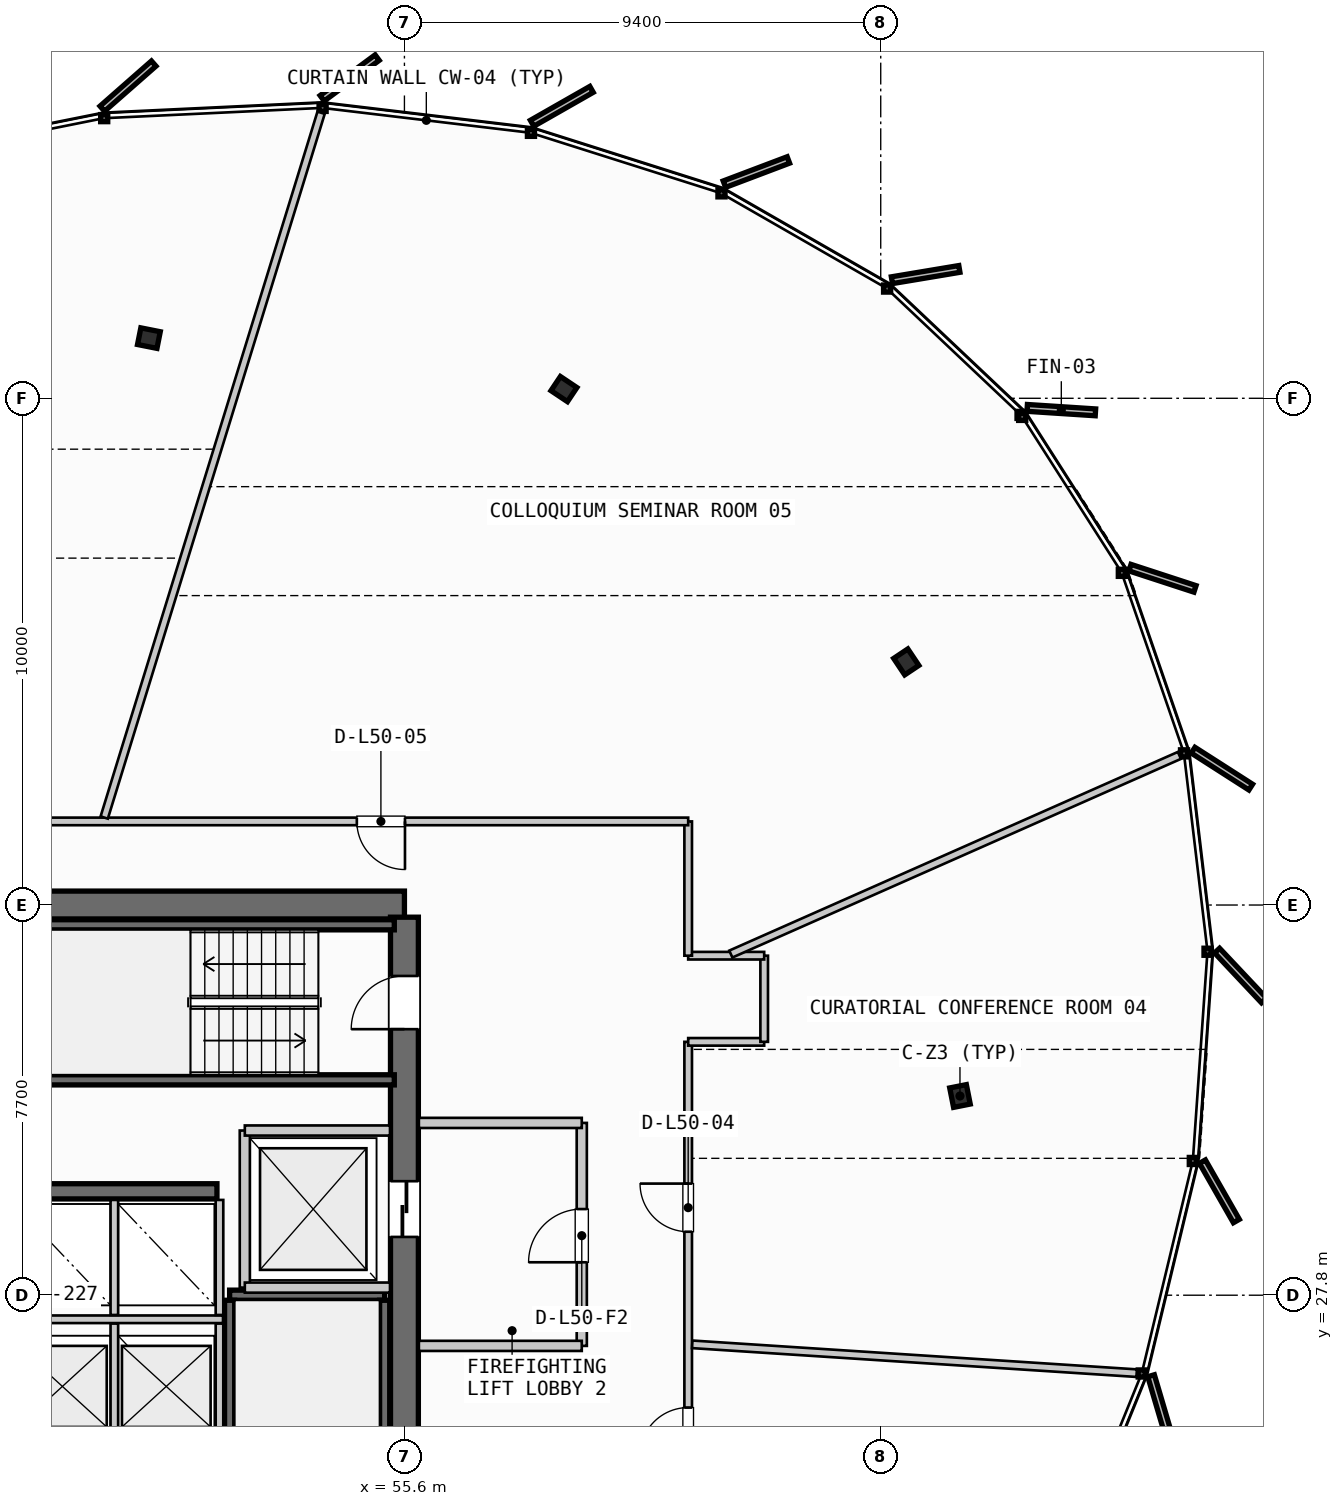
"""IFC4 building model, lengths in metres.
Left out: names, types, materials, properties, quantities, classifications, styles, units other than length and angle.
Written with IfcOpenShell. Run it as: python <this file> out.ifc"""

import sys

from ifc_helpers import new_model, si_unit, direction, frame, frame_2d, origin, origin_2d, place, context, subcontext, project, spatial, rectangle, i_section, extrude, source, transform, mapped, element, fill, save


model = new_model("IFC4")
c1 = context("Model", 3, precision=1e-05, world=origin(), true_north=direction((0.0, 1.0)))
c2 = subcontext(c1, "Body", "Model", "MODEL_VIEW")
j1 = project(units=[si_unit("LENGTHUNIT", "METRE"), si_unit("PLANEANGLEUNIT", "RADIAN")], contexts=[c1])
p1 = place(None, origin())
s1 = spatial("IfcSite", under=j1, at=p1, CompositionType="ELEMENT")
p2 = place(p1, origin())
s2 = spatial("IfcBuilding", under=s1, at=p2, CompositionType="ELEMENT")
p3 = place(p2, frame((0.0, 0.0, 193.9)))
s3 = spatial("IfcBuildingStorey", under=s2, at=p3, CompositionType="ELEMENT", Elevation=193.9)
p4 = place(p3, frame((55.6, 35.5, 0.0), z_axis=(0.0, 0.0, 1.0), x_axis=(-1.0, 0.0, 0.0)))
e1 = element("IfcWall", 1, at=p4, inside=s3, PredefinedType="SHEAR", context=c2, shape_type="SweptSolid", body=[
    extrude(rectangle(XDim=17.6, YDim=0.55, at=frame_2d((8.8, 0.0))), origin(), (0.0, 0.0, 1.0), 3.26),
])
p5 = place(p4, frame((8.05, 0.0, 0.0)))
e2 = element("IfcOpeningElement", 2, at=p5, cuts=e1, PredefinedType="OPENING", context=c2, shape_type="SweptSolid", body=[
    extrude(rectangle(XDim=1.5, YDim=2.2, at=frame_2d((0.75, 1.1))), frame((0.0, 0.285, 0.0), z_axis=(0.0, -1.0, 0.0), x_axis=(1.0, 0.0, 0.0)), (0.0, 0.0, 1.0), 0.57),
])
p6 = place(p4, frame((15.1, 0.0, 0.0)))
e3 = element("IfcOpeningElement", 3, at=p6, cuts=e1, PredefinedType="OPENING", context=c2, shape_type="SweptSolid", body=[
    extrude(rectangle(XDim=0.95, YDim=2.15, at=frame_2d((0.475, 1.075))), frame((0.0, 0.285, 0.0), z_axis=(0.0, -1.0, 0.0), x_axis=(1.0, 0.0, 0.0)), (0.0, 0.0, 1.0), 0.57),
])
p7 = place(p4, frame((12.9, 0.0, 0.0)))
e4 = element("IfcOpeningElement", 4, at=p7, cuts=e1, PredefinedType="OPENING", context=c2, shape_type="SweptSolid", body=[
    extrude(rectangle(XDim=0.9, YDim=2.15, at=frame_2d((0.45, 1.075))), frame((0.0, 0.285, 0.0), z_axis=(0.0, -1.0, 0.0), x_axis=(1.0, 0.0, 0.0)), (0.0, 0.0, 1.0), 0.57),
])
p8 = place(p4, frame((10.6, 0.0, 0.0)))
e5 = element("IfcOpeningElement", 5, at=p8, cuts=e1, PredefinedType="OPENING", context=c2, shape_type="SweptSolid", body=[
    extrude(rectangle(XDim=0.95, YDim=2.15, at=frame_2d((0.475, 1.075))), frame((0.0, 0.285, 0.0), z_axis=(0.0, -1.0, 0.0), x_axis=(1.0, 0.0, 0.0)), (0.0, 0.0, 1.0), 0.57),
])
p9 = place(p3, frame((55.6, 20.34, 0.0), z_axis=(0.0, 0.0, 1.0), x_axis=(0.0, 1.0, 0.0)))
e6 = element("IfcWall", 6, at=p9, inside=s3, PredefinedType="SHEAR", context=c2, shape_type="SweptSolid", body=[
    extrude(rectangle(XDim=14.92, YDim=0.55, at=frame_2d((7.46, 0.0))), origin(), (0.0, 0.0, 1.0), 3.26),
])
p10 = place(p9, frame((12.71, 0.0, 0.0)))
e7 = element("IfcOpeningElement", 7, at=p10, cuts=e6, PredefinedType="OPENING", context=c2, shape_type="SweptSolid", body=[
    extrude(rectangle(XDim=1.05, YDim=2.15, at=frame_2d((0.525, 1.075))), frame((0.0, 0.285, 0.0), z_axis=(0.0, -1.0, 0.0), x_axis=(1.0, 0.0, 0.0)), (0.0, 0.0, 1.0), 0.57),
])
p11 = place(p9, frame((8.61, 0.0, 0.0)))
e8 = element("IfcOpeningElement", 8, at=p11, cuts=e6, PredefinedType="OPENING", context=c2, shape_type="SweptSolid", body=[
    extrude(rectangle(XDim=1.1, YDim=2.2, at=frame_2d((0.55, 1.1))), frame((0.0, 0.285, 0.0), z_axis=(0.0, -1.0, 0.0), x_axis=(1.0, 0.0, 0.0)), (0.0, 0.0, 1.0), 0.57),
])
p12 = place(p3, frame((47.65, 29.85, 0.0), z_axis=(0.0, 0.0, 1.0), x_axis=(1.0, 0.0, 0.0)))
e9 = element("IfcWall", 9, at=p12, inside=s3, PredefinedType="SHEAR", context=c2, shape_type="SweptSolid", body=[
    extrude(rectangle(XDim=4.25, YDim=0.3, at=frame_2d((2.125, 0.0))), origin(), (0.0, 0.0, 1.0), 3.26),
])
m1 = source(origin(), c2, "Body", "SweptSolid", [
    extrude(i_section(OverallWidth=0.391, OverallDepth=0.335, WebThickness=0.023, FlangeThickness=0.034, FilletRadius=0.015, at=origin_2d()), origin(), (0.0, 0.0, 1.0), 3.26),
])
for number, where, z_axis, x_axis in (
    (10, (66.564, 31.731, 0.0), (0.0, 0.0, 1.0), (0.981, 0.195, 0.0)),
    (11, (65.504, 40.298, 0.0), (0.0, 0.0, 1.0), (0.831, 0.556, 0.0)),
    (12, (58.748, 45.681, 0.0), (0.0, 0.0, 1.0), (0.556, 0.831, 0.0)),
    (13, (50.557, 46.688, 0.0), (0.0, 0.0, 1.0), (0.195, 0.981, 0.0)),
):
    element("IfcColumn", number, at=place(p3, frame(where, z_axis=z_axis, x_axis=x_axis)), inside=s3, PredefinedType="COLUMN", context=c2, shape_type="MappedRepresentation", body=[
        mapped(m1, transform((0.0, 0.0, 0.0), scale=1.0)),
    ])
p13 = place(p3, frame((52.15, 27.8, 0.0), z_axis=(0.0, 0.0, 1.0), x_axis=(1.0, 0.0, 0.0)))
e14 = element("IfcWall", 14, at=p13, inside=s3, PredefinedType="SHEAR", context=c2, shape_type="SweptSolid", body=[
    extrude(rectangle(XDim=3.06, YDim=0.2, at=frame_2d((1.53, 0.0))), origin(), (0.0, 0.0, 1.0), 3.26),
])
for number, where, z_axis, x_axis in (
    (15, (55.21, 27.7, 0.0), (0.0, 0.0, 1.0), (0.0, -1.0, 0.0)),
    (16, (52.15, 20.35, 0.0), (0.0, 0.0, 1.0), (0.0, 1.0, 0.0)),
    (17, (48.05, 35.11, 0.0), (0.0, 0.0, 1.0), (1.0, 0.0, 0.0)),
    (18, (55.4, 32.05, 0.0), (0.0, 0.0, 1.0), (-1.0, 0.0, 0.0)),
):
    element("IfcWall", number, at=place(p3, frame(where, z_axis=z_axis, x_axis=x_axis)), inside=s3, PredefinedType="SHEAR", context=c2, shape_type="SweptSolid", body=[
        extrude(rectangle(XDim=7.35, YDim=0.2, at=frame_2d((3.675, 0.0))), origin(), (0.0, 0.0, 1.0), 3.26),
    ])
p14 = place(p3, frame((52.45, 27.95, 0.0), z_axis=(0.0, 0.0, 1.0), x_axis=(0.0, 1.0, 0.0)))
e19 = element("IfcWall", 19, at=p14, inside=s3, PredefinedType="PARTITIONING", context=c2, shape_type="SweptSolid", body=[
    extrude(rectangle(XDim=3.1, YDim=0.2, at=frame_2d((1.55, 0.0))), origin(), (0.0, 0.0, 1.0), 2.735),
])
for number, where, z_axis, x_axis in (
    (20, (52.45, 27.95, 0.0), (0.0, 0.0, 1.0), (1.0, 0.0, 0.0)),
    (21, (52.45, 31.05, 0.0), (0.0, 0.0, 1.0), (1.0, 0.0, 0.0)),
):
    element("IfcWall", number, at=place(p3, frame(where, z_axis=z_axis, x_axis=x_axis)), inside=s3, PredefinedType="PARTITIONING", context=c2, shape_type="SweptSolid", body=[
        extrude(rectangle(XDim=2.865, YDim=0.2, at=frame_2d((1.433, 0.0))), origin(), (0.0, 0.0, 1.0), 2.735),
    ])
p15 = place(p3, frame((59.1, 26.8, 0.0), z_axis=(0.0, 0.0, 1.0), x_axis=(0.0, 1.0, 0.0)))
e22 = element("IfcWall", 22, at=p15, inside=s3, PredefinedType="PARTITIONING", context=c2, shape_type="SweptSolid", body=[
    extrude(rectangle(XDim=4.4, YDim=0.2, at=frame_2d((2.2, 0.0))), origin(), (0.0, 0.0, 1.0), 2.735),
])
p16 = place(p15, frame((1.65, 0.0, 0.0)))
e23 = element("IfcOpeningElement", 23, at=p16, cuts=e22, PredefinedType="OPENING", context=c2, shape_type="SweptSolid", body=[
    extrude(rectangle(XDim=1.05, YDim=2.15, at=frame_2d((0.525, 1.075))), frame((0.0, 0.11, 0.0), z_axis=(0.0, -1.0, 0.0), x_axis=(1.0, 0.0, 0.0)), (0.0, 0.0, 1.0), 0.22),
])
for number, where, z_axis, x_axis in (
    (24, (55.885, 26.8, 0.0), (0.0, 0.0, 1.0), (1.0, 0.0, 0.0)),
    (25, (55.885, 31.2, 0.0), (0.0, 0.0, 1.0), (1.0, 0.0, 0.0)),
):
    element("IfcWall", number, at=place(p3, frame(where, z_axis=z_axis, x_axis=x_axis)), inside=s3, PredefinedType="PARTITIONING", context=c2, shape_type="SweptSolid", body=[
        extrude(rectangle(XDim=3.215, YDim=0.2, at=frame_2d((1.607, 0.0))), origin(), (0.0, 0.0, 1.0), 2.735),
    ])
p17 = place(p3, frame((47.7, 27.325, 0.0), z_axis=(0.0, 0.0, 1.0), x_axis=(1.0, 0.0, 0.0)))
e26 = element("IfcWall", 26, at=p17, inside=s3, PredefinedType="PARTITIONING", context=c2, shape_type="SweptSolid", body=[
    extrude(rectangle(XDim=4.32, YDim=0.15, at=frame_2d((2.16, 0.0))), origin(), (0.0, 0.0, 1.0), 2.735),
])
for number, where, z_axis, x_axis in (
    (27, (49.875, 24.92, 0.0), (0.0, 0.0, 1.0), (0.0, 1.0, 0.0)),
    (28, (51.95, 24.92, 0.0), (0.0, 0.0, 1.0), (0.0, 1.0, 0.0)),
):
    element("IfcWall", number, at=place(p3, frame(where, z_axis=z_axis, x_axis=x_axis)), inside=s3, PredefinedType="PARTITIONING", context=c2, shape_type="SweptSolid", body=[
        extrude(rectangle(XDim=2.32, YDim=0.15, at=frame_2d((1.16, 0.0))), origin(), (0.0, 0.0, 1.0), 2.735),
    ])
for number, where, z_axis, x_axis in (
    (29, (49.875, 27.41, 0.0), (0.0, 0.0, 1.0), (0.0, 1.0, 0.0)),
    (30, (51.95, 27.41, 0.0), (0.0, 0.0, 1.0), (0.0, 1.0, 0.0)),
):
    element("IfcWall", number, at=place(p3, frame(where, z_axis=z_axis, x_axis=x_axis)), inside=s3, PredefinedType="PARTITIONING", context=c2, shape_type="SweptSolid", body=[
        extrude(rectangle(XDim=2.27, YDim=0.15, at=frame_2d((1.135, 0.0))), origin(), (0.0, 0.0, 1.0), 2.735),
    ])
p18 = place(p3, frame((61.2, 22.8, 0.0), z_axis=(0.0, 0.0, 1.0), x_axis=(0.0, 1.0, 0.0)))
e31 = element("IfcWall", 31, at=p18, inside=s3, PredefinedType="PARTITIONING", context=c2, shape_type="SweptSolid", body=[
    extrude(rectangle(XDim=10.0, YDim=0.15, at=frame_2d((5.0, 0.0))), origin(), (0.0, 0.0, 1.0), 2.735),
])
p19 = place(p18, frame((1.833, 0.0, 0.0)))
e32 = element("IfcOpeningElement", 32, at=p19, cuts=e31, PredefinedType="OPENING", context=c2, shape_type="SweptSolid", body=[
    extrude(rectangle(XDim=0.95, YDim=2.15, at=frame_2d((0.475, 1.075))), frame((0.0, 0.085, 0.0), z_axis=(0.0, -1.0, 0.0), x_axis=(1.0, 0.0, 0.0)), (0.0, 0.0, 1.0), 0.17),
])
p20 = place(p18, frame((6.253, 0.0, 0.0)))
e33 = element("IfcOpeningElement", 33, at=p20, cuts=e31, PredefinedType="OPENING", context=c2, shape_type="SweptSolid", body=[
    extrude(rectangle(XDim=0.95, YDim=2.15, at=frame_2d((0.475, 1.075))), frame((0.0, 0.085, 0.0), z_axis=(0.0, -1.0, 0.0), x_axis=(1.0, 0.0, 0.0)), (0.0, 0.0, 1.0), 0.17),
])
p21 = place(p3, frame((61.2, 32.8, 0.0), z_axis=(0.0, 0.0, 1.0), x_axis=(1.0, 0.0, 0.0)))
e34 = element("IfcWall", 34, at=p21, inside=s3, PredefinedType="PARTITIONING", context=c2, shape_type="SweptSolid", body=[
    extrude(rectangle(XDim=1.5, YDim=0.15, at=frame_2d((0.75, 0.0))), origin(), (0.0, 0.0, 1.0), 2.735),
])
p22 = place(p3, frame((62.7, 32.8, 0.0), z_axis=(0.0, 0.0, 1.0), x_axis=(0.0, 1.0, 0.0)))
e35 = element("IfcWall", 35, at=p22, inside=s3, PredefinedType="PARTITIONING", context=c2, shape_type="SweptSolid", body=[
    extrude(rectangle(XDim=1.7, YDim=0.15, at=frame_2d((0.85, 0.0))), origin(), (0.0, 0.0, 1.0), 2.735),
])
p23 = place(p3, frame((62.7, 34.5, 0.0), z_axis=(0.0, 0.0, 1.0), x_axis=(-1.0, 0.0, 0.0)))
e36 = element("IfcWall", 36, at=p23, inside=s3, PredefinedType="PARTITIONING", context=c2, shape_type="SweptSolid", body=[
    extrude(rectangle(XDim=1.5, YDim=0.15, at=frame_2d((0.75, 0.0))), origin(), (0.0, 0.0, 1.0), 2.735),
])
p24 = place(p3, frame((61.2, 34.5, 0.0), z_axis=(0.0, 0.0, 1.0), x_axis=(0.0, 1.0, 0.0)))
e37 = element("IfcWall", 37, at=p24, inside=s3, PredefinedType="PARTITIONING", context=c2, shape_type="SweptSolid", body=[
    extrude(rectangle(XDim=2.65, YDim=0.15, at=frame_2d((1.325, 0.0))), origin(), (0.0, 0.0, 1.0), 2.735),
])
p25 = place(p3, frame((61.2, 37.15, 0.0), z_axis=(0.0, 0.0, 1.0), x_axis=(-1.0, 0.0, 0.0)))
e38 = element("IfcWall", 38, at=p25, inside=s3, PredefinedType="PARTITIONING", context=c2, shape_type="SweptSolid", body=[
    extrude(rectangle(XDim=28.35, YDim=0.15, at=frame_2d((14.175, 0.0))), origin(), (0.0, 0.0, 1.0), 2.735),
])
p26 = place(p25, frame((5.589, 0.0, 0.0)))
e39 = element("IfcOpeningElement", 39, at=p26, cuts=e38, PredefinedType="OPENING", context=c2, shape_type="SweptSolid", body=[
    extrude(rectangle(XDim=0.95, YDim=2.15, at=frame_2d((0.475, 1.075))), frame((0.0, 0.085, 0.0), z_axis=(0.0, -1.0, 0.0), x_axis=(1.0, 0.0, 0.0)), (0.0, 0.0, 1.0), 0.17),
])
p27 = place(p25, frame((18.507, 0.0, 0.0)))
e40 = element("IfcOpeningElement", 40, at=p27, cuts=e38, PredefinedType="OPENING", context=c2, shape_type="SweptSolid", body=[
    extrude(rectangle(XDim=0.95, YDim=2.15, at=frame_2d((0.475, 1.075))), frame((0.0, 0.085, 0.0), z_axis=(0.0, -1.0, 0.0), x_axis=(1.0, 0.0, 0.0)), (0.0, 0.0, 1.0), 0.17),
])
p28 = place(p3, frame((61.28, 26.831, 0.0), z_axis=(0.0, 0.0, 1.0), x_axis=(0.99790192977, -0.064743637227, 0.0)))
e41 = element("IfcWall", 41, at=p28, inside=s3, PredefinedType="PARTITIONING", context=c2, shape_type="SweptSolid", body=[
    extrude(rectangle(XDim=8.79, YDim=0.15, at=frame_2d((4.395, 0.0))), origin(), (0.0, 0.0, 1.0), 2.735),
])
p29 = place(p3, frame((62.042, 34.532, 0.0), z_axis=(0.0, 0.0, 1.0), x_axis=(0.91436285984, 0.40489574034, 0.0)))
e42 = element("IfcWall", 42, at=p29, inside=s3, PredefinedType="PARTITIONING", context=c2, shape_type="SweptSolid", body=[
    extrude(rectangle(XDim=9.682, YDim=0.15, at=frame_2d((4.841, 0.0))), origin(), (0.0, 0.0, 1.0), 2.735),
])
p30 = place(p3, frame((49.675, 37.227, 0.0), z_axis=(0.0, 0.0, 1.0), x_axis=(0.294123572803, 0.955767400533, 0.0)))
e43 = element("IfcWall", 43, at=p30, inside=s3, PredefinedType="PARTITIONING", context=c2, shape_type="SweptSolid", body=[
    extrude(rectangle(XDim=14.553, YDim=0.15, at=frame_2d((7.276, 0.0))), origin(), (0.0, 0.0, 1.0), 2.735),
])
m2 = source(origin(), c2, "Body", "SweptSolid", [
    extrude(rectangle(XDim=1.05, YDim=2.15, at=frame_2d((0.525, 1.075))), frame((0.0, 0.025, 0.0), z_axis=(0.0, -1.0, 0.0), x_axis=(1.0, 0.0, 0.0)), (0.0, 0.0, 1.0), 0.05),
])
p31 = place(p10, origin())
e44 = element("IfcDoor", 44, at=p31, inside=s3, OperationType="SINGLE_SWING_LEFT", PredefinedType="DOOR", context=c2, shape_type="MappedRepresentation", body=[
    mapped(m2, transform((0.0, 0.0, 0.0), scale=1.0)),
])
fill(e7, e44)
m3 = source(origin(), c2, "Body", "SweptSolid", [
    extrude(rectangle(XDim=1.1, YDim=2.2, at=frame_2d((0.55, 1.1))), frame((0.0, 0.025, 0.0), z_axis=(0.0, -1.0, 0.0), x_axis=(1.0, 0.0, 0.0)), (0.0, 0.0, 1.0), 0.05),
])
p32 = place(p11, origin())
e45 = element("IfcDoor", 45, at=p32, inside=s3, OperationType="SLIDING_TO_RIGHT", PredefinedType="DOOR", context=c2, shape_type="MappedRepresentation", body=[
    mapped(m3, transform((0.0, 0.0, 0.0), scale=1.0)),
])
fill(e8, e45)
p33 = place(p16, origin())
e46 = element("IfcDoor", 46, at=p33, inside=s3, OperationType="SINGLE_SWING_LEFT", PredefinedType="DOOR", context=c2, shape_type="MappedRepresentation", body=[
    mapped(m2, transform((0.0, 0.0, 0.0), scale=1.0)),
])
fill(e23, e46)
m4 = source(origin(), c2, "Body", "SweptSolid", [
    extrude(rectangle(XDim=0.95, YDim=2.15, at=frame_2d((0.475, 1.075))), frame((0.0, 0.025, 0.0), z_axis=(0.0, -1.0, 0.0), x_axis=(1.0, 0.0, 0.0)), (0.0, 0.0, 1.0), 0.05),
])
p34 = place(p19, origin())
e47 = element("IfcDoor", 47, at=p34, inside=s3, OperationType="SINGLE_SWING_LEFT", PredefinedType="DOOR", context=c2, shape_type="MappedRepresentation", body=[
    mapped(m4, transform((0.0, 0.0, 0.0), scale=1.0)),
])
fill(e32, e47)
p35 = place(p20, origin())
e48 = element("IfcDoor", 48, at=p35, inside=s3, OperationType="SINGLE_SWING_RIGHT", PredefinedType="DOOR", context=c2, shape_type="MappedRepresentation", body=[
    mapped(m4, transform((0.0, 0.0, 0.0), scale=1.0)),
])
fill(e33, e48)
p36 = place(p26, origin())
e49 = element("IfcDoor", 49, at=p36, inside=s3, OperationType="SINGLE_SWING_LEFT", PredefinedType="DOOR", context=c2, shape_type="MappedRepresentation", body=[
    mapped(m4, transform((0.0, 0.0, 0.0), scale=1.0)),
])
fill(e39, e49)
save(model, sys.argv[1])
